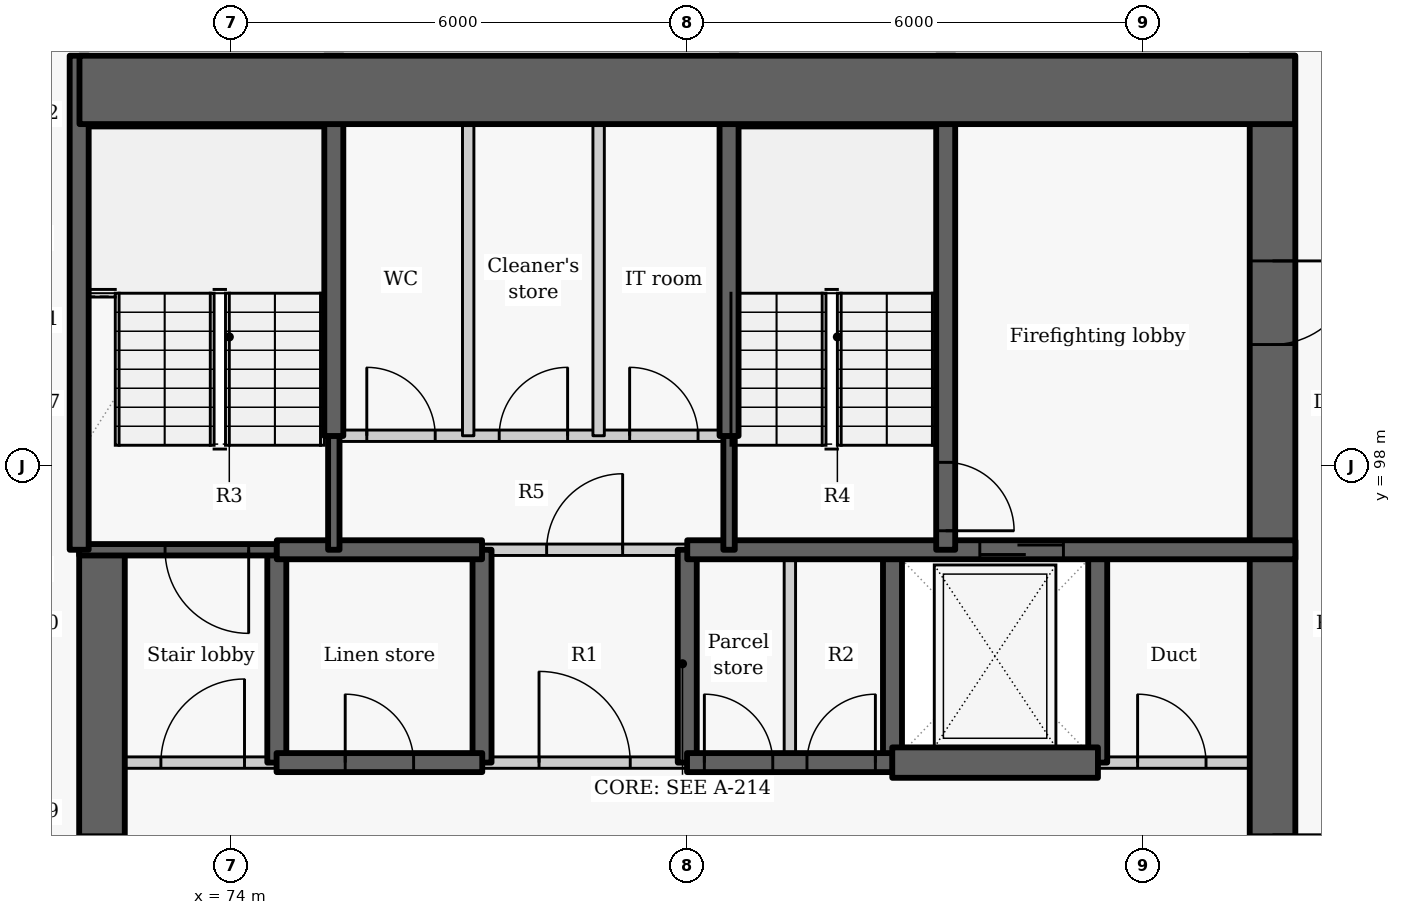
"""IFC4 building model, lengths in metres.
Left out: names, types, materials, properties, quantities, classifications, styles, units other than length and angle.
Written with IfcOpenShell. Run it as: python <this file> out.ifc"""

import sys

from ifc_helpers import new_model, si_unit, direction, frame, frame_2d, origin, place, context, subcontext, project, spatial, rectangle, extrude, element, fill, save


model = new_model("IFC4")
c1 = context("Model", 3, precision=1e-05, world=origin(), true_north=direction((0.0, 1.0)))
c2 = subcontext(c1, "Body", "Model", "MODEL_VIEW")
j1 = project(units=[si_unit("LENGTHUNIT", "METRE"), si_unit("PLANEANGLEUNIT", "RADIAN")], contexts=[c1])
p1 = place(None, origin())
s1 = spatial("IfcSite", under=j1, at=p1, CompositionType="ELEMENT")
p2 = place(p1, origin())
s2 = spatial("IfcBuilding", under=s1, at=p2, CompositionType="ELEMENT")
p3 = place(p2, frame((0.0, 0.0, 67.8)))
s3 = spatial("IfcBuildingStorey", under=s2, at=p3, CompositionType="ELEMENT", Elevation=67.8)
p4 = place(p3, frame((74.6, 94.1, -0.275), z_axis=(0.0, 0.0, 1.0), x_axis=(0.0, 1.0, 0.0)))
e1 = element("IfcWall", 1, at=p4, inside=s3, PredefinedType="SHEAR", context=c2, shape_type="SweptSolid", body=[
    extrude(rectangle(XDim=2.8, YDim=0.25, at=frame_2d((1.4, 0.0))), origin(), (0.0, 0.0, 1.0), 3.225),
])
p5 = place(p3, frame((72.3, 87.8, -0.275), z_axis=(0.0, 0.0, 1.0), x_axis=(0.0, 1.0, 0.0)))
e2 = element("IfcWall", 2, at=p5, inside=s3, PredefinedType="SHEAR", context=c2, shape_type="SweptSolid", body=[
    extrude(rectangle(XDim=9.1, YDim=0.6, at=frame_2d((4.55, 0.0))), origin(), (0.0, 0.0, 1.0), 3.225),
])
p6 = place(p5, frame((3.85, 0.0, 0.275)))
e3 = element("IfcOpeningElement", 3, at=p6, cuts=e2, PredefinedType="OPENING", context=c2, shape_type="SweptSolid", body=[
    extrude(rectangle(XDim=1.5, YDim=2.1, at=frame_2d((0.75, 1.05))), frame((0.0, 0.31, 0.0), z_axis=(0.0, -1.0, 0.0), x_axis=(1.0, 0.0, 0.0)), (0.0, 0.0, 1.0), 0.62),
])
for number, where, z_axis, x_axis in (
    (4, (77.3, 94.1, -0.275), (0.0, 0.0, 1.0), (0.0, 1.0, 0.0)),
    (5, (80.0, 94.1, -0.275), (0.0, 0.0, 1.0), (0.0, 1.0, 0.0)),
    (6, (82.7, 94.1, -0.275), (0.0, 0.0, 1.0), (0.0, 1.0, 0.0)),
    (7, (85.4, 94.1, -0.275), (0.0, 0.0, 1.0), (0.0, 1.0, 0.0)),
):
    element("IfcWall", number, at=place(p3, frame(where, z_axis=z_axis, x_axis=x_axis)), inside=s3, PredefinedType="SHEAR", context=c2, shape_type="SweptSolid", body=[
        extrude(rectangle(XDim=2.8, YDim=0.25, at=frame_2d((1.4, 0.0))), origin(), (0.0, 0.0, 1.0), 3.225),
    ])
p7 = place(p3, frame((87.7, 103.4, -0.275), z_axis=(0.0, 0.0, 1.0), x_axis=(0.0, -1.0, 0.0)))
e8 = element("IfcWall", 8, at=p7, inside=s3, PredefinedType="SHEAR", context=c2, shape_type="SweptSolid", body=[
    extrude(rectangle(XDim=15.6, YDim=0.6, at=frame_2d((7.8, 0.0))), origin(), (0.0, 0.0, 1.0), 3.225),
])
p8 = place(p7, frame((10.25, 0.0, 0.275)))
e9 = element("IfcOpeningElement", 9, at=p8, cuts=e8, PredefinedType="OPENING", context=c2, shape_type="SweptSolid", body=[
    extrude(rectangle(XDim=1.5, YDim=2.1, at=frame_2d((0.75, 1.05))), frame((0.0, 0.31, 0.0), z_axis=(0.0, -1.0, 0.0), x_axis=(1.0, 0.0, 0.0)), (0.0, 0.0, 1.0), 0.62),
])
p9 = place(p7, frame((2.7, 0.0, 0.275)))
e10 = element("IfcOpeningElement", 10, at=p9, cuts=e8, PredefinedType="OPENING", context=c2, shape_type="SweptSolid", body=[
    extrude(rectangle(XDim=1.1, YDim=2.1, at=frame_2d((0.55, 1.05))), frame((0.0, 0.31, 0.0), z_axis=(0.0, -1.0, 0.0), x_axis=(1.0, 0.0, 0.0)), (0.0, 0.0, 1.0), 0.62),
])
p10 = place(p3, frame((72.0, 94.1, 0.0), z_axis=(0.0, 0.0, 1.0), x_axis=(1.0, 0.0, 0.0)))
e11 = element("IfcWall", 11, at=p10, inside=s3, PredefinedType="PARTITIONING", context=c2, shape_type="SweptSolid", body=[
    extrude(rectangle(XDim=2.603, YDim=0.15, at=frame_2d((1.302, 0.0))), origin(), (0.0, 0.0, 1.0), 2.95),
])
p11 = place(p10, frame((1.075, 0.0, 0.0)))
e12 = element("IfcOpeningElement", 12, at=p11, cuts=e11, PredefinedType="OPENING", context=c2, shape_type="SweptSolid", body=[
    extrude(rectangle(XDim=1.1, YDim=2.1, at=frame_2d((0.55, 1.05))), frame((0.0, 0.085, 0.0), z_axis=(0.0, -1.0, 0.0), x_axis=(1.0, 0.0, 0.0)), (0.0, 0.0, 1.0), 0.17),
])
p12 = place(p3, frame((77.297, 94.1, 0.0), z_axis=(0.0, 0.0, 1.0), x_axis=(1.0, 0.0, 0.0)))
e13 = element("IfcWall", 13, at=p12, inside=s3, PredefinedType="PARTITIONING", context=c2, shape_type="SweptSolid", body=[
    extrude(rectangle(XDim=2.706, YDim=0.15, at=frame_2d((1.353, 0.0))), origin(), (0.0, 0.0, 1.0), 2.95),
])
p13 = place(p12, frame((0.753, 0.0, 0.0)))
e14 = element("IfcOpeningElement", 14, at=p13, cuts=e13, PredefinedType="OPENING", context=c2, shape_type="SweptSolid", body=[
    extrude(rectangle(XDim=1.2, YDim=2.1, at=frame_2d((0.6, 1.05))), frame((0.0, 0.085, 0.0), z_axis=(0.0, -1.0, 0.0), x_axis=(1.0, 0.0, 0.0)), (0.0, 0.0, 1.0), 0.17),
])
p14 = place(p3, frame((85.397, 94.1, 0.0), z_axis=(0.0, 0.0, 1.0), x_axis=(1.0, 0.0, 0.0)))
e15 = element("IfcWall", 15, at=p14, inside=s3, PredefinedType="PARTITIONING", context=c2, shape_type="SweptSolid", body=[
    extrude(rectangle(XDim=2.603, YDim=0.15, at=frame_2d((1.302, 0.0))), origin(), (0.0, 0.0, 1.0), 2.95),
])
p15 = place(p14, frame((0.528, 0.0, 0.0)))
e16 = element("IfcOpeningElement", 16, at=p15, cuts=e15, PredefinedType="OPENING", context=c2, shape_type="SweptSolid", body=[
    extrude(rectangle(XDim=0.9, YDim=2.1, at=frame_2d((0.45, 1.05))), frame((0.0, 0.085, 0.0), z_axis=(0.0, -1.0, 0.0), x_axis=(1.0, 0.0, 0.0)), (0.0, 0.0, 1.0), 0.17),
])
p16 = place(p3, frame((74.597, 94.1, -0.275), z_axis=(0.0, 0.0, 1.0), x_axis=(1.0, 0.0, 0.0)))
e17 = element("IfcWall", 17, at=p16, inside=s3, PredefinedType="SHEAR", context=c2, shape_type="SweptSolid", body=[
    extrude(rectangle(XDim=2.706, YDim=0.25, at=frame_2d((1.353, 0.0))), origin(), (0.0, 0.0, 1.0), 3.225),
])
p17 = place(p16, frame((0.903, 0.0, 0.275)))
e18 = element("IfcOpeningElement", 18, at=p17, cuts=e17, PredefinedType="OPENING", context=c2, shape_type="SweptSolid", body=[
    extrude(rectangle(XDim=0.9, YDim=2.1, at=frame_2d((0.45, 1.05))), frame((0.0, 0.135, 0.0), z_axis=(0.0, -1.0, 0.0), x_axis=(1.0, 0.0, 0.0)), (0.0, 0.0, 1.0), 0.27),
])
p18 = place(p3, frame((79.997, 94.1, -0.275), z_axis=(0.0, 0.0, 1.0), x_axis=(1.0, 0.0, 0.0)))
e19 = element("IfcWall", 19, at=p18, inside=s3, PredefinedType="SHEAR", context=c2, shape_type="SweptSolid", body=[
    extrude(rectangle(XDim=2.706, YDim=0.25, at=frame_2d((1.353, 0.0))), origin(), (0.0, 0.0, 1.0), 3.225),
])
p19 = place(p18, frame((0.228, 0.0, 0.275)))
e20 = element("IfcOpeningElement", 20, at=p19, cuts=e19, PredefinedType="OPENING", context=c2, shape_type="SweptSolid", body=[
    extrude(rectangle(XDim=0.9, YDim=2.1, at=frame_2d((0.45, 1.05))), frame((0.0, 0.135, 0.0), z_axis=(0.0, -1.0, 0.0), x_axis=(1.0, 0.0, 0.0)), (0.0, 0.0, 1.0), 0.27),
])
p20 = place(p18, frame((1.578, 0.0, 0.275)))
e21 = element("IfcOpeningElement", 21, at=p20, cuts=e19, PredefinedType="OPENING", context=c2, shape_type="SweptSolid", body=[
    extrude(rectangle(XDim=0.9, YDim=2.1, at=frame_2d((0.45, 1.05))), frame((0.0, 0.135, 0.0), z_axis=(0.0, -1.0, 0.0), x_axis=(1.0, 0.0, 0.0)), (0.0, 0.0, 1.0), 0.27),
])
p21 = place(p3, frame((82.697, 94.1, -0.275), z_axis=(0.0, 0.0, 1.0), x_axis=(1.0, 0.0, 0.0)))
e22 = element("IfcWall", 22, at=p21, inside=s3, PredefinedType="SHEAR", context=c2, shape_type="SweptSolid", body=[
    extrude(rectangle(XDim=2.706, YDim=0.4, at=frame_2d((1.353, 0.0))), origin(), (0.0, 0.0, 1.0), 3.225),
])
p22 = place(p3, frame((74.6, 96.9, -0.275), z_axis=(0.0, 0.0, 1.0), x_axis=(-1.0, 0.0, 0.0)))
e23 = element("IfcWall", 23, at=p22, inside=s3, PredefinedType="SHEAR", context=c2, shape_type="SweptSolid", body=[
    extrude(rectangle(XDim=2.6, YDim=0.15, at=frame_2d((1.3, 0.0))), origin(), (0.0, 0.0, 1.0), 3.225),
])
p23 = place(p22, frame((0.37, 0.0, 0.275)))
e24 = element("IfcOpeningElement", 24, at=p23, cuts=e23, PredefinedType="OPENING", context=c2, shape_type="SweptSolid", body=[
    extrude(rectangle(XDim=1.1, YDim=2.1, at=frame_2d((0.55, 1.05))), frame((0.0, 0.085, 0.0), z_axis=(0.0, -1.0, 0.0), x_axis=(1.0, 0.0, 0.0)), (0.0, 0.0, 1.0), 0.17),
])
p24 = place(p3, frame((74.6, 96.9, -0.275), z_axis=(0.0, 0.0, 1.0), x_axis=(1.0, 0.0, 0.0)))
e25 = element("IfcWall", 25, at=p24, inside=s3, PredefinedType="SHEAR", context=c2, shape_type="SweptSolid", body=[
    extrude(rectangle(XDim=2.7, YDim=0.25, at=frame_2d((1.35, 0.0))), origin(), (0.0, 0.0, 1.0), 3.225),
])
p25 = place(p3, frame((80.0, 96.9, -0.275), z_axis=(0.0, 0.0, 1.0), x_axis=(1.0, 0.0, 0.0)))
e26 = element("IfcWall", 26, at=p25, inside=s3, PredefinedType="SHEAR", context=c2, shape_type="SweptSolid", body=[
    extrude(rectangle(XDim=8.0, YDim=0.25, at=frame_2d((4.0, 0.0))), origin(), (0.0, 0.0, 1.0), 3.225),
])
p26 = place(p25, frame((3.849, 0.0, 0.275)))
e27 = element("IfcOpeningElement", 27, at=p26, cuts=e26, PredefinedType="OPENING", context=c2, shape_type="SweptSolid", body=[
    extrude(rectangle(XDim=1.1, YDim=2.1, at=frame_2d((0.55, 1.05))), frame((0.0, 0.135, 0.0), z_axis=(0.0, -1.0, 0.0), x_axis=(1.0, 0.0, 0.0)), (0.0, 0.0, 1.0), 0.27),
])
p27 = place(p3, frame((77.3, 96.9, 0.0), z_axis=(0.0, 0.0, 1.0), x_axis=(1.0, 0.0, 0.0)))
e28 = element("IfcWall", 28, at=p27, inside=s3, PredefinedType="PARTITIONING", context=c2, shape_type="SweptSolid", body=[
    extrude(rectangle(XDim=2.7, YDim=0.15, at=frame_2d((1.35, 0.0))), origin(), (0.0, 0.0, 1.0), 2.95),
])
p28 = place(p27, frame((0.85, 0.0, 0.0)))
e29 = element("IfcOpeningElement", 29, at=p28, cuts=e28, PredefinedType="OPENING", context=c2, shape_type="SweptSolid", body=[
    extrude(rectangle(XDim=1.0, YDim=2.1, at=frame_2d((0.5, 1.05))), frame((0.0, 0.085, 0.0), z_axis=(0.0, -1.0, 0.0), x_axis=(1.0, 0.0, 0.0)), (0.0, 0.0, 1.0), 0.17),
])
p29 = place(p3, frame((81.35, 94.1, 0.0), z_axis=(0.0, 0.0, 1.0), x_axis=(0.0, 1.0, 0.0)))
e30 = element("IfcWall", 30, at=p29, inside=s3, PredefinedType="PARTITIONING", context=c2, shape_type="SweptSolid", body=[
    extrude(rectangle(XDim=2.8, YDim=0.15, at=frame_2d((1.4, 0.0))), origin(), (0.0, 0.0, 1.0), 2.95),
])
p30 = place(p3, frame((75.35, 96.9, -0.275), z_axis=(0.0, 0.0, 1.0), x_axis=(0.0, 1.0, 0.0)))
e31 = element("IfcWall", 31, at=p30, inside=s3, PredefinedType="SHEAR", context=c2, shape_type="SweptSolid", body=[
    extrude(rectangle(XDim=1.503, YDim=0.15, at=frame_2d((0.751, 0.0))), origin(), (0.0, 0.0, 1.0), 3.225),
])
p31 = place(p3, frame((75.35, 98.397, -0.275), z_axis=(0.0, 0.0, 1.0), x_axis=(0.0, 1.0, 0.0)))
e32 = element("IfcWall", 32, at=p31, inside=s3, PredefinedType="SHEAR", context=c2, shape_type="SweptSolid", body=[
    extrude(rectangle(XDim=5.003, YDim=0.25, at=frame_2d((2.501, 0.0))), origin(), (0.0, 0.0, 1.0), 3.225),
])
p32 = place(p3, frame((72.0, 96.9, -0.275), z_axis=(0.0, 0.0, 1.0), x_axis=(0.0, 1.0, 0.0)))
e33 = element("IfcWall", 33, at=p32, inside=s3, PredefinedType="SHEAR", context=c2, shape_type="SweptSolid", body=[
    extrude(rectangle(XDim=6.5, YDim=0.25, at=frame_2d((3.25, 0.0))), origin(), (0.0, 0.0, 1.0), 3.225),
])
p33 = place(p3, frame((83.4, 103.4, -0.275), z_axis=(0.0, 0.0, 1.0), x_axis=(0.0, -1.0, 0.0)))
e34 = element("IfcWall", 34, at=p33, inside=s3, PredefinedType="SHEAR", context=c2, shape_type="SweptSolid", body=[
    extrude(rectangle(XDim=6.5, YDim=0.25, at=frame_2d((3.25, 0.0))), origin(), (0.0, 0.0, 1.0), 3.225),
])
p34 = place(p33, frame((5.35, 0.0, 0.275)))
e35 = element("IfcOpeningElement", 35, at=p34, cuts=e34, PredefinedType="OPENING", context=c2, shape_type="SweptSolid", body=[
    extrude(rectangle(XDim=0.9, YDim=2.1, at=frame_2d((0.45, 1.05))), frame((0.0, 0.135, 0.0), z_axis=(0.0, -1.0, 0.0), x_axis=(1.0, 0.0, 0.0)), (0.0, 0.0, 1.0), 0.27),
])
p35 = place(p3, frame((80.55, 96.9, -0.275), z_axis=(0.0, 0.0, 1.0), x_axis=(0.0, 1.0, 0.0)))
e36 = element("IfcWall", 36, at=p35, inside=s3, PredefinedType="SHEAR", context=c2, shape_type="SweptSolid", body=[
    extrude(rectangle(XDim=1.503, YDim=0.15, at=frame_2d((0.751, 0.0))), origin(), (0.0, 0.0, 1.0), 3.225),
])
p36 = place(p3, frame((80.55, 98.397, -0.275), z_axis=(0.0, 0.0, 1.0), x_axis=(0.0, 1.0, 0.0)))
e37 = element("IfcWall", 37, at=p36, inside=s3, PredefinedType="SHEAR", context=c2, shape_type="SweptSolid", body=[
    extrude(rectangle(XDim=5.003, YDim=0.25, at=frame_2d((2.501, 0.0))), origin(), (0.0, 0.0, 1.0), 3.225),
])
p37 = place(p3, frame((75.35, 98.4, 0.0), z_axis=(0.0, 0.0, 1.0), x_axis=(1.0, 0.0, 0.0)))
e38 = element("IfcWall", 38, at=p37, inside=s3, PredefinedType="PARTITIONING", context=c2, shape_type="SweptSolid", body=[
    extrude(rectangle(XDim=5.2, YDim=0.15, at=frame_2d((2.6, 0.0))), origin(), (0.0, 0.0, 1.0), 2.95),
])
p38 = place(p37, frame((0.434, 0.0, 0.0)))
e39 = element("IfcOpeningElement", 39, at=p38, cuts=e38, PredefinedType="OPENING", context=c2, shape_type="SweptSolid", body=[
    extrude(rectangle(XDim=0.9, YDim=2.1, at=frame_2d((0.45, 1.05))), frame((0.0, 0.085, 0.0), z_axis=(0.0, -1.0, 0.0), x_axis=(1.0, 0.0, 0.0)), (0.0, 0.0, 1.0), 0.17),
])
p39 = place(p37, frame((2.176, 0.0, 0.0)))
e40 = element("IfcOpeningElement", 40, at=p39, cuts=e38, PredefinedType="OPENING", context=c2, shape_type="SweptSolid", body=[
    extrude(rectangle(XDim=0.9, YDim=2.1, at=frame_2d((0.45, 1.05))), frame((0.0, 0.085, 0.0), z_axis=(0.0, -1.0, 0.0), x_axis=(1.0, 0.0, 0.0)), (0.0, 0.0, 1.0), 0.17),
])
p40 = place(p37, frame((3.892, 0.0, 0.0)))
e41 = element("IfcOpeningElement", 41, at=p40, cuts=e38, PredefinedType="OPENING", context=c2, shape_type="SweptSolid", body=[
    extrude(rectangle(XDim=0.9, YDim=2.1, at=frame_2d((0.45, 1.05))), frame((0.0, 0.085, 0.0), z_axis=(0.0, -1.0, 0.0), x_axis=(1.0, 0.0, 0.0)), (0.0, 0.0, 1.0), 0.17),
])
for number, where, z_axis, x_axis in (
    (42, (77.118, 98.4, 0.0), (0.0, 0.0, 1.0), (0.0, 1.0, 0.0)),
    (43, (78.834, 98.4, 0.0), (0.0, 0.0, 1.0), (0.0, 1.0, 0.0)),
):
    element("IfcWall", number, at=place(p3, frame(where, z_axis=z_axis, x_axis=x_axis)), inside=s3, PredefinedType="PARTITIONING", context=c2, shape_type="SweptSolid", body=[
        extrude(rectangle(XDim=5.0, YDim=0.15, at=frame_2d((2.5, 0.0))), origin(), (0.0, 0.0, 1.0), 2.95),
    ])
p41 = place(p3, frame((72.004, 102.95, -0.275), z_axis=(0.0, 0.0, 1.0), x_axis=(1.0, 0.0, 0.0)))
e44 = element("IfcWall", 44, at=p41, inside=s3, PredefinedType="SHEAR", context=c2, shape_type="SweptSolid", body=[
    extrude(rectangle(XDim=15.992, YDim=0.9, at=frame_2d((7.996, 0.0))), origin(), (0.0, 0.0, 1.0), 3.225),
])
p42 = place(p11, origin())
e45 = element("IfcDoor", 45, at=p42, inside=s3, OperationType="SINGLE_SWING_RIGHT", PredefinedType="DOOR", context=c2, shape_type="SweptSolid", body=[
    extrude(rectangle(XDim=1.1, YDim=2.1, at=frame_2d((0.55, 1.05))), frame((0.0, 0.025, 0.0), z_axis=(0.0, -1.0, 0.0), x_axis=(1.0, 0.0, 0.0)), (0.0, 0.0, 1.0), 0.05),
])
fill(e12, e45)
p43 = place(p17, origin())
e46 = element("IfcDoor", 46, at=p43, inside=s3, OperationType="SINGLE_SWING_LEFT", PredefinedType="DOOR", context=c2, shape_type="SweptSolid", body=[
    extrude(rectangle(XDim=0.9, YDim=2.1, at=frame_2d((0.45, 1.05))), frame((0.0, 0.025, 0.0), z_axis=(0.0, -1.0, 0.0), x_axis=(1.0, 0.0, 0.0)), (0.0, 0.0, 1.0), 0.05),
])
fill(e18, e46)
p44 = place(p13, origin())
e47 = element("IfcDoor", 47, at=p44, inside=s3, OperationType="DOUBLE_DOOR_SINGLE_SWING", PredefinedType="DOOR", context=c2, shape_type="SweptSolid", body=[
    extrude(rectangle(XDim=1.2, YDim=2.1, at=frame_2d((0.6, 1.05))), frame((0.0, 0.025, 0.0), z_axis=(0.0, -1.0, 0.0), x_axis=(1.0, 0.0, 0.0)), (0.0, 0.0, 1.0), 0.05),
])
fill(e14, e47)
p45 = place(p19, origin())
e48 = element("IfcDoor", 48, at=p45, inside=s3, OperationType="SINGLE_SWING_LEFT", PredefinedType="DOOR", context=c2, shape_type="SweptSolid", body=[
    extrude(rectangle(XDim=0.9, YDim=2.1, at=frame_2d((0.45, 1.05))), frame((0.0, 0.025, 0.0), z_axis=(0.0, -1.0, 0.0), x_axis=(1.0, 0.0, 0.0)), (0.0, 0.0, 1.0), 0.05),
])
fill(e20, e48)
p46 = place(p20, origin())
e49 = element("IfcDoor", 49, at=p46, inside=s3, OperationType="SINGLE_SWING_RIGHT", PredefinedType="DOOR", context=c2, shape_type="SweptSolid", body=[
    extrude(rectangle(XDim=0.9, YDim=2.1, at=frame_2d((0.45, 1.05))), frame((0.0, 0.025, 0.0), z_axis=(0.0, -1.0, 0.0), x_axis=(1.0, 0.0, 0.0)), (0.0, 0.0, 1.0), 0.05),
])
fill(e21, e49)
p47 = place(p26, origin())
e50 = element("IfcDoor", 50, at=p47, inside=s3, OperationType="SLIDING_TO_LEFT", PredefinedType="DOOR", context=c2, shape_type="SweptSolid", body=[
    extrude(rectangle(XDim=1.1, YDim=2.1, at=frame_2d((0.55, 1.05))), frame((0.0, 0.025, 0.0), z_axis=(0.0, -1.0, 0.0), x_axis=(1.0, 0.0, 0.0)), (0.0, 0.0, 1.0), 0.05),
])
fill(e27, e50)
p48 = place(p15, origin())
e51 = element("IfcDoor", 51, at=p48, inside=s3, OperationType="SINGLE_SWING_LEFT", PredefinedType="DOOR", context=c2, shape_type="SweptSolid", body=[
    extrude(rectangle(XDim=0.9, YDim=2.1, at=frame_2d((0.45, 1.05))), frame((0.0, 0.025, 0.0), z_axis=(0.0, -1.0, 0.0), x_axis=(1.0, 0.0, 0.0)), (0.0, 0.0, 1.0), 0.05),
])
fill(e16, e51)
p49 = place(p28, origin())
e52 = element("IfcDoor", 52, at=p49, inside=s3, OperationType="SINGLE_SWING_RIGHT", PredefinedType="DOOR", context=c2, shape_type="SweptSolid", body=[
    extrude(rectangle(XDim=1.0, YDim=2.1, at=frame_2d((0.5, 1.05))), frame((0.0, 0.025, 0.0), z_axis=(0.0, -1.0, 0.0), x_axis=(1.0, 0.0, 0.0)), (0.0, 0.0, 1.0), 0.05),
])
fill(e29, e52)
p50 = place(p38, origin())
e53 = element("IfcDoor", 53, at=p50, inside=s3, OperationType="SINGLE_SWING_LEFT", PredefinedType="DOOR", context=c2, shape_type="SweptSolid", body=[
    extrude(rectangle(XDim=0.9, YDim=2.1, at=frame_2d((0.45, 1.05))), frame((0.0, 0.025, 0.0), z_axis=(0.0, -1.0, 0.0), x_axis=(1.0, 0.0, 0.0)), (0.0, 0.0, 1.0), 0.05),
])
fill(e39, e53)
p51 = place(p39, origin())
e54 = element("IfcDoor", 54, at=p51, inside=s3, OperationType="SINGLE_SWING_RIGHT", PredefinedType="DOOR", context=c2, shape_type="SweptSolid", body=[
    extrude(rectangle(XDim=0.9, YDim=2.1, at=frame_2d((0.45, 1.05))), frame((0.0, 0.025, 0.0), z_axis=(0.0, -1.0, 0.0), x_axis=(1.0, 0.0, 0.0)), (0.0, 0.0, 1.0), 0.05),
])
fill(e40, e54)
p52 = place(p40, origin())
e55 = element("IfcDoor", 55, at=p52, inside=s3, OperationType="SINGLE_SWING_LEFT", PredefinedType="DOOR", context=c2, shape_type="SweptSolid", body=[
    extrude(rectangle(XDim=0.9, YDim=2.1, at=frame_2d((0.45, 1.05))), frame((0.0, 0.025, 0.0), z_axis=(0.0, -1.0, 0.0), x_axis=(1.0, 0.0, 0.0)), (0.0, 0.0, 1.0), 0.05),
])
fill(e41, e55)
p53 = place(p23, origin())
e56 = element("IfcDoor", 56, at=p53, inside=s3, OperationType="SINGLE_SWING_LEFT", PredefinedType="DOOR", context=c2, shape_type="SweptSolid", body=[
    extrude(rectangle(XDim=1.1, YDim=2.1, at=frame_2d((0.55, 1.05))), frame((0.0, 0.025, 0.0), z_axis=(0.0, -1.0, 0.0), x_axis=(1.0, 0.0, 0.0)), (0.0, 0.0, 1.0), 0.05),
])
fill(e24, e56)
p54 = place(p34, origin())
e57 = element("IfcDoor", 57, at=p54, inside=s3, OperationType="SINGLE_SWING_RIGHT", PredefinedType="DOOR", context=c2, shape_type="SweptSolid", body=[
    extrude(rectangle(XDim=0.9, YDim=2.1, at=frame_2d((0.45, 1.05))), frame((0.0, 0.025, 0.0), z_axis=(0.0, -1.0, 0.0), x_axis=(1.0, 0.0, 0.0)), (0.0, 0.0, 1.0), 0.05),
])
fill(e35, e57)
p55 = place(p6, origin())
e58 = element("IfcDoor", 58, at=p55, inside=s3, OperationType="DOUBLE_DOOR_SINGLE_SWING", PredefinedType="DOOR", context=c2, shape_type="SweptSolid", body=[
    extrude(rectangle(XDim=1.5, YDim=2.1, at=frame_2d((0.75, 1.05))), frame((0.0, 0.025, 0.0), z_axis=(0.0, -1.0, 0.0), x_axis=(1.0, 0.0, 0.0)), (0.0, 0.0, 1.0), 0.05),
])
fill(e3, e58)
p56 = place(p9, origin())
e59 = element("IfcDoor", 59, at=p56, inside=s3, OperationType="SINGLE_SWING_LEFT", PredefinedType="DOOR", context=c2, shape_type="SweptSolid", body=[
    extrude(rectangle(XDim=1.1, YDim=2.1, at=frame_2d((0.55, 1.05))), frame((0.0, 0.025, 0.0), z_axis=(0.0, -1.0, 0.0), x_axis=(1.0, 0.0, 0.0)), (0.0, 0.0, 1.0), 0.05),
])
fill(e10, e59)
save(model, sys.argv[1])
